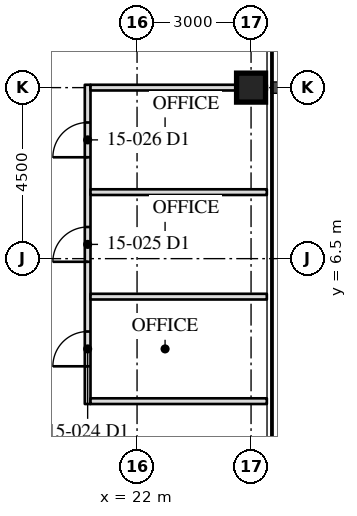
"""IFC4 building model, lengths in metres.
Left out: names, types, materials, properties, quantities, classifications, styles, units other than length and angle.
Written with IfcOpenShell. Run it as: python <this file> out.ifc"""

import sys

from ifc_helpers import new_model, si_unit, direction, frame, frame_2d, origin, origin_2d, place, context, subcontext, project, spatial, rectangle, hollow_rectangle, extrude, element, fill, save


model = new_model("IFC4")
c1 = context("Model", 3, precision=1e-05, world=origin(), true_north=direction((0.0, 1.0)))
c2 = subcontext(c1, "Body", "Model", "MODEL_VIEW")
j1 = project(units=[si_unit("LENGTHUNIT", "METRE"), si_unit("PLANEANGLEUNIT", "RADIAN")], contexts=[c1])
p1 = place(None, origin())
s1 = spatial("IfcSite", under=j1, at=p1, CompositionType="ELEMENT")
p2 = place(p1, origin())
s2 = spatial("IfcBuilding", under=s1, at=p2, CompositionType="ELEMENT")
p3 = place(p2, frame((0.0, 0.0, 65.2)))
s3 = spatial("IfcBuildingStorey", under=s2, at=p3, CompositionType="ELEMENT", Elevation=65.2)
p4 = place(p3, frame((25.0, 11.0, 0.0), z_axis=(0.0, 0.0, 1.0), x_axis=(0.0, 1.0, 0.0)))
e1 = element("IfcColumn", 1, at=p4, inside=s3, PredefinedType="COLUMN", context=c2, shape_type="SweptSolid", body=[
    extrude(hollow_rectangle(XDim=0.762, YDim=0.762, WallThickness=0.127, at=origin_2d()), origin(), (0.0, 0.0, 1.0), 4.1),
])
p5 = place(p3, frame((20.7, 2.675, 0.0), z_axis=(0.0, 0.0, 1.0), x_axis=(0.0, 1.0, 0.0)))
e2 = element("IfcWall", 2, at=p5, inside=s3, PredefinedType="PARTITIONING", context=c2, shape_type="SweptSolid", body=[
    extrude(rectangle(XDim=8.4, YDim=0.15, at=frame_2d((4.2, 0.0))), origin(), (0.0, 0.0, 1.0), 3.91),
])
p6 = place(p5, frame((0.992, 0.0, 0.0)))
e3 = element("IfcOpeningElement", 3, at=p6, cuts=e2, PredefinedType="OPENING", context=c2, shape_type="SweptSolid", body=[
    extrude(rectangle(XDim=0.915, YDim=2.134, at=frame_2d((0.458, 1.067))), frame((0.0, 0.085, 0.0), z_axis=(0.0, -1.0, 0.0), x_axis=(1.0, 0.0, 0.0)), (0.0, 0.0, 1.0), 0.17),
])
p7 = place(p5, frame((3.742, 0.0, 0.0)))
e4 = element("IfcOpeningElement", 4, at=p7, cuts=e2, PredefinedType="OPENING", context=c2, shape_type="SweptSolid", body=[
    extrude(rectangle(XDim=0.915, YDim=2.134, at=frame_2d((0.458, 1.067))), frame((0.0, 0.085, 0.0), z_axis=(0.0, -1.0, 0.0), x_axis=(1.0, 0.0, 0.0)), (0.0, 0.0, 1.0), 0.17),
])
p8 = place(p5, frame((6.492, 0.0, 0.0)))
e5 = element("IfcOpeningElement", 5, at=p8, cuts=e2, PredefinedType="OPENING", context=c2, shape_type="SweptSolid", body=[
    extrude(rectangle(XDim=0.915, YDim=2.134, at=frame_2d((0.458, 1.067))), frame((0.0, 0.085, 0.0), z_axis=(0.0, -1.0, 0.0), x_axis=(1.0, 0.0, 0.0)), (0.0, 0.0, 1.0), 0.17),
])
for number, where, z_axis, x_axis in (
    (6, (20.775, 2.75, 0.0), (0.0, 0.0, 1.0), (1.0, 0.0, 0.0)),
    (7, (20.775, 5.5, 0.0), (0.0, 0.0, 1.0), (1.0, 0.0, 0.0)),
    (8, (20.775, 8.25, 0.0), (0.0, 0.0, 1.0), (1.0, 0.0, 0.0)),
):
    element("IfcWall", number, at=place(p3, frame(where, z_axis=z_axis, x_axis=x_axis)), inside=s3, PredefinedType="PARTITIONING", context=c2, shape_type="SweptSolid", body=[
        extrude(rectangle(XDim=4.64, YDim=0.15, at=frame_2d((2.32, 0.0))), origin(), (0.0, 0.0, 1.0), 3.91),
    ])
p9 = place(p3, frame((20.775, 11.0, 0.0), z_axis=(0.0, 0.0, 1.0), x_axis=(1.0, 0.0, 0.0)))
e9 = element("IfcWall", 9, at=p9, inside=s3, PredefinedType="PARTITIONING", context=c2, shape_type="SweptSolid", body=[
    extrude(rectangle(XDim=4.64, YDim=0.15, at=frame_2d((2.32, 0.0))), origin(), (0.0, 0.0, 1.0), 3.13),
])
p10 = place(p6, origin())
e10 = element("IfcDoor", 10, at=p10, inside=s3, OperationType="SINGLE_SWING_LEFT", PredefinedType="DOOR", context=c2, shape_type="SweptSolid", body=[
    extrude(rectangle(XDim=0.915, YDim=2.134, at=frame_2d((0.458, 1.067))), frame((0.0, 0.025, 0.0), z_axis=(0.0, -1.0, 0.0), x_axis=(1.0, 0.0, 0.0)), (0.0, 0.0, 1.0), 0.05),
])
fill(e3, e10)
p11 = place(p7, origin())
e11 = element("IfcDoor", 11, at=p11, inside=s3, OperationType="SINGLE_SWING_LEFT", PredefinedType="DOOR", context=c2, shape_type="SweptSolid", body=[
    extrude(rectangle(XDim=0.915, YDim=2.134, at=frame_2d((0.458, 1.067))), frame((0.0, 0.025, 0.0), z_axis=(0.0, -1.0, 0.0), x_axis=(1.0, 0.0, 0.0)), (0.0, 0.0, 1.0), 0.05),
])
fill(e4, e11)
p12 = place(p8, origin())
e12 = element("IfcDoor", 12, at=p12, inside=s3, OperationType="SINGLE_SWING_LEFT", PredefinedType="DOOR", context=c2, shape_type="SweptSolid", body=[
    extrude(rectangle(XDim=0.915, YDim=2.134, at=frame_2d((0.458, 1.067))), frame((0.0, 0.025, 0.0), z_axis=(0.0, -1.0, 0.0), x_axis=(1.0, 0.0, 0.0)), (0.0, 0.0, 1.0), 0.05),
])
fill(e5, e12)
save(model, sys.argv[1])
